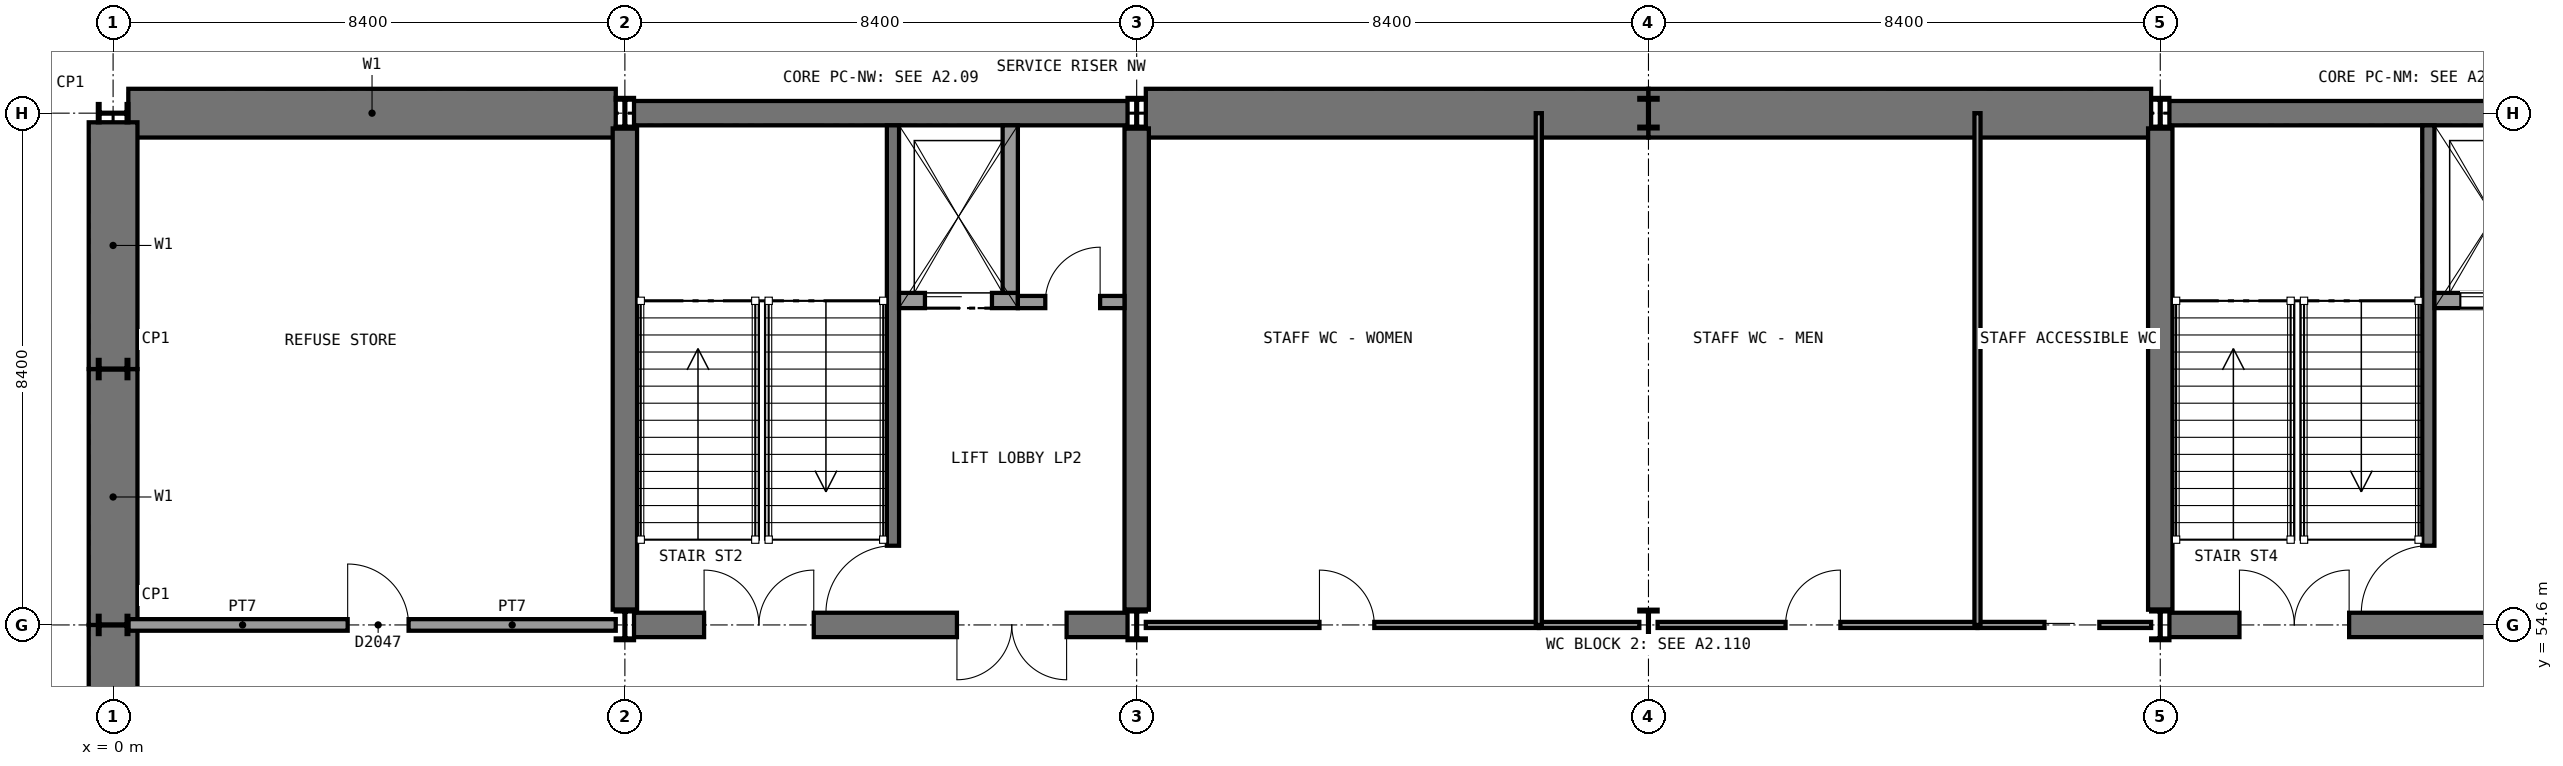
"""IFC4 building model, lengths in metres.
Left out: names, types, materials, properties, quantities, classifications, styles, units other than length and angle.
Written with IfcOpenShell. Run it as: python <this file> out.ifc"""

import sys

from ifc_helpers import new_model, si_unit, direction, frame, frame_2d, origin, origin_2d, place, context, subcontext, project, spatial, rectangle, i_section, extrude, element, fill, save


model = new_model("IFC4")
c1 = context("Model", 3, precision=1e-05, world=origin(), true_north=direction((0.0, 1.0)))
c2 = subcontext(c1, "Body", "Model", "MODEL_VIEW")
j1 = project(units=[si_unit("LENGTHUNIT", "METRE"), si_unit("PLANEANGLEUNIT", "RADIAN")], contexts=[c1])
p1 = place(None, origin())
s1 = spatial("IfcSite", under=j1, at=p1, CompositionType="ELEMENT")
p2 = place(p1, origin())
s2 = spatial("IfcBuilding", under=s1, at=p2, CompositionType="ELEMENT")
p3 = place(p2, frame((0.0, 0.0, -9.9)))
s3 = spatial("IfcBuildingStorey", under=s2, at=p3, CompositionType="ELEMENT", Elevation=-9.9)
p4 = place(p3, frame((0.25, 63.0, 0.0), z_axis=(0.0, 0.0, 1.0), x_axis=(1.0, 0.0, 0.0)))
e1 = element("IfcWall", 1, at=p4, inside=s3, PredefinedType="SOLIDWALL", context=c2, shape_type="SweptSolid", body=[
    extrude(rectangle(XDim=8.0, YDim=0.8, at=frame_2d((4.0, 0.0))), origin(), (0.0, 0.0, 1.0), 4.65),
])
p5 = place(p3, frame((16.95, 63.0, 0.0), z_axis=(0.0, 0.0, 1.0), x_axis=(1.0, 0.0, 0.0)))
e2 = element("IfcWall", 2, at=p5, inside=s3, PredefinedType="SOLIDWALL", context=c2, shape_type="SweptSolid", body=[
    extrude(rectangle(XDim=8.25, YDim=0.8, at=frame_2d((4.125, 0.0))), origin(), (0.0, 0.0, 1.0), 4.65),
])
p6 = place(p3, frame((25.2, 63.0, 0.0), z_axis=(0.0, 0.0, 1.0), x_axis=(1.0, 0.0, 0.0)))
e3 = element("IfcWall", 3, at=p6, inside=s3, PredefinedType="SOLIDWALL", context=c2, shape_type="SweptSolid", body=[
    extrude(rectangle(XDim=8.25, YDim=0.8, at=frame_2d((4.125, 0.0))), origin(), (0.0, 0.0, 1.0), 4.65),
])
p7 = place(p3, frame((0.0, 50.4, 0.0), z_axis=(0.0, 0.0, 1.0), x_axis=(0.0, 1.0, 0.0)))
e4 = element("IfcWall", 4, at=p7, inside=s3, PredefinedType="SOLIDWALL", context=c2, shape_type="SweptSolid", body=[
    extrude(rectangle(XDim=4.2, YDim=0.8, at=frame_2d((2.1, 0.0))), origin(), (0.0, 0.0, 1.0), 4.65),
])
p8 = place(p3, frame((0.0, 54.6, 0.0), z_axis=(0.0, 0.0, 1.0), x_axis=(0.0, 1.0, 0.0)))
e5 = element("IfcWall", 5, at=p8, inside=s3, PredefinedType="SOLIDWALL", context=c2, shape_type="SweptSolid", body=[
    extrude(rectangle(XDim=4.2, YDim=0.8, at=frame_2d((2.1, 0.0))), origin(), (0.0, 0.0, 1.0), 4.65),
])
p9 = place(p3, frame((0.0, 58.8, 0.0), z_axis=(0.0, 0.0, 1.0), x_axis=(0.0, 1.0, 0.0)))
e6 = element("IfcWall", 6, at=p9, inside=s3, PredefinedType="SOLIDWALL", context=c2, shape_type="SweptSolid", body=[
    extrude(rectangle(XDim=4.05, YDim=0.8, at=frame_2d((2.025, 0.0))), origin(), (0.0, 0.0, 1.0), 4.65),
])
p10 = place(p3, frame((8.55, 63.0, 0.0), z_axis=(0.0, 0.0, 1.0), x_axis=(1.0, 0.0, 0.0)))
e7 = element("IfcWall", 7, at=p10, inside=s3, PredefinedType="SHEAR", context=c2, shape_type="SweptSolid", body=[
    extrude(rectangle(XDim=8.1, YDim=0.4, at=frame_2d((4.05, 0.0))), origin(), (0.0, 0.0, 1.0), 4.65),
])
p11 = place(p3, frame((8.55, 54.6, 0.0), z_axis=(0.0, 0.0, 1.0), x_axis=(1.0, 0.0, 0.0)))
e8 = element("IfcWall", 8, at=p11, inside=s3, PredefinedType="SHEAR", context=c2, shape_type="SweptSolid", body=[
    extrude(rectangle(XDim=8.1, YDim=0.4, at=frame_2d((4.05, 0.0))), origin(), (0.0, 0.0, 1.0), 4.65),
])
p12 = place(p11, frame((1.15, 0.0, 0.0)))
e9 = element("IfcOpeningElement", 9, at=p12, cuts=e8, PredefinedType="OPENING", context=c2, shape_type="SweptSolid", body=[
    extrude(rectangle(XDim=1.8, YDim=2.1, at=frame_2d((0.9, 1.05))), frame((0.0, 0.21, 0.0), z_axis=(0.0, -1.0, 0.0), x_axis=(1.0, 0.0, 0.0)), (0.0, 0.0, 1.0), 0.42),
])
p13 = place(p11, frame((5.3, 0.0, 0.0)))
e10 = element("IfcOpeningElement", 10, at=p13, cuts=e8, PredefinedType="OPENING", context=c2, shape_type="SweptSolid", body=[
    extrude(rectangle(XDim=1.8, YDim=2.1, at=frame_2d((0.9, 1.05))), frame((0.0, 0.21, 0.0), z_axis=(0.0, -1.0, 0.0), x_axis=(1.0, 0.0, 0.0)), (0.0, 0.0, 1.0), 0.42),
])
for number, where, z_axis, x_axis in (
    (11, (8.4, 54.85, 0.0), (0.0, 0.0, 1.0), (0.0, 1.0, 0.0)),
    (12, (16.8, 54.85, 0.0), (0.0, 0.0, 1.0), (0.0, 1.0, 0.0)),
):
    element("IfcWall", number, at=place(p3, frame(where, z_axis=z_axis, x_axis=x_axis)), inside=s3, PredefinedType="SHEAR", context=c2, shape_type="SweptSolid", body=[
        extrude(rectangle(XDim=7.9, YDim=0.4, at=frame_2d((3.95, 0.0))), origin(), (0.0, 0.0, 1.0), 4.65),
    ])
p14 = place(p3, frame((33.75, 63.0, 0.0), z_axis=(0.0, 0.0, 1.0), x_axis=(1.0, 0.0, 0.0)))
e13 = element("IfcWall", 13, at=p14, inside=s3, PredefinedType="SHEAR", context=c2, shape_type="SweptSolid", body=[
    extrude(rectangle(XDim=8.1, YDim=0.4, at=frame_2d((4.05, 0.0))), origin(), (0.0, 0.0, 1.0), 4.65),
])
p15 = place(p3, frame((33.75, 54.6, 0.0), z_axis=(0.0, 0.0, 1.0), x_axis=(1.0, 0.0, 0.0)))
e14 = element("IfcWall", 14, at=p15, inside=s3, PredefinedType="SHEAR", context=c2, shape_type="SweptSolid", body=[
    extrude(rectangle(XDim=8.1, YDim=0.4, at=frame_2d((4.05, 0.0))), origin(), (0.0, 0.0, 1.0), 4.65),
])
p16 = place(p15, frame((1.15, 0.0, 0.0)))
e15 = element("IfcOpeningElement", 15, at=p16, cuts=e14, PredefinedType="OPENING", context=c2, shape_type="SweptSolid", body=[
    extrude(rectangle(XDim=1.8, YDim=2.1, at=frame_2d((0.9, 1.05))), frame((0.0, 0.21, 0.0), z_axis=(0.0, -1.0, 0.0), x_axis=(1.0, 0.0, 0.0)), (0.0, 0.0, 1.0), 0.42),
])
p17 = place(p15, frame((5.3, 0.0, 0.0)))
e16 = element("IfcOpeningElement", 16, at=p17, cuts=e14, PredefinedType="OPENING", context=c2, shape_type="SweptSolid", body=[
    extrude(rectangle(XDim=1.8, YDim=2.1, at=frame_2d((0.9, 1.05))), frame((0.0, 0.21, 0.0), z_axis=(0.0, -1.0, 0.0), x_axis=(1.0, 0.0, 0.0)), (0.0, 0.0, 1.0), 0.42),
])
p18 = place(p3, frame((33.6, 54.85, 0.0), z_axis=(0.0, 0.0, 1.0), x_axis=(0.0, 1.0, 0.0)))
e17 = element("IfcWall", 17, at=p18, inside=s3, PredefinedType="SHEAR", context=c2, shape_type="SweptSolid", body=[
    extrude(rectangle(XDim=7.9, YDim=0.4, at=frame_2d((3.95, 0.0))), origin(), (0.0, 0.0, 1.0), 4.65),
])
for number, where, z_axis, x_axis in (
    (18, (0.0, 54.6, 0.0), (0.0, 0.0, 1.0), (0.0, 1.0, 0.0)),
    (19, (0.0, 58.8, 0.0), (0.0, 0.0, 1.0), (0.0, 1.0, 0.0)),
    (20, (0.0, 63.0, 0.0), (0.0, 0.0, 1.0), (0.0, 1.0, 0.0)),
    (21, (8.4, 54.6, 0.0), (0.0, 0.0, 1.0), (1.0, 0.0, 0.0)),
    (22, (8.4, 63.0, 0.0), (0.0, 0.0, 1.0), (1.0, 0.0, 0.0)),
    (23, (16.8, 54.6, 0.0), (0.0, 0.0, 1.0), (1.0, 0.0, 0.0)),
    (24, (16.8, 63.0, 0.0), (0.0, 0.0, 1.0), (1.0, 0.0, 0.0)),
    (25, (25.2, 54.6, 0.0), (0.0, 0.0, 1.0), (1.0, 0.0, 0.0)),
    (26, (25.2, 63.0, 0.0), (0.0, 0.0, 1.0), (1.0, 0.0, 0.0)),
    (27, (33.6, 54.6, 0.0), (0.0, 0.0, 1.0), (1.0, 0.0, 0.0)),
    (28, (33.6, 63.0, 0.0), (0.0, 0.0, 1.0), (1.0, 0.0, 0.0)),
):
    element("IfcColumn", number, at=place(p3, frame(where, z_axis=z_axis, x_axis=x_axis)), inside=s3, PredefinedType="COLUMN", context=c2, shape_type="SweptSolid", body=[
        extrude(i_section(OverallWidth=0.3, OverallDepth=0.5, WebThickness=0.014, FlangeThickness=0.028, FilletRadius=0.027, at=origin_2d()), origin(), (0.0, 0.0, 1.0), 5.0),
    ])
p19 = place(p3, frame((0.25, 54.6, 0.0), z_axis=(0.0, 0.0, 1.0), x_axis=(1.0, 0.0, 0.0)))
e29 = element("IfcWall", 29, at=p19, inside=s3, PredefinedType="SOLIDWALL", context=c2, shape_type="SweptSolid", body=[
    extrude(rectangle(XDim=8.0, YDim=0.19, at=frame_2d((4.0, 0.0))), origin(), (0.0, 0.0, 1.0), 4.65),
])
p20 = place(p19, frame((3.6, 0.0, 0.0)))
e30 = element("IfcOpeningElement", 30, at=p20, cuts=e29, PredefinedType="OPENING", context=c2, shape_type="SweptSolid", body=[
    extrude(rectangle(XDim=1.0, YDim=2.1, at=frame_2d((0.5, 1.05))), frame((0.0, 0.105, 0.0), z_axis=(0.0, -1.0, 0.0), x_axis=(1.0, 0.0, 0.0)), (0.0, 0.0, 1.0), 0.21),
])
p21 = place(p3, frame((16.95, 54.6, 0.0), z_axis=(0.0, 0.0, 1.0), x_axis=(1.0, 0.0, 0.0)))
e31 = element("IfcWall", 31, at=p21, inside=s3, PredefinedType="PARTITIONING", context=c2, shape_type="SweptSolid", body=[
    extrude(rectangle(XDim=6.45, YDim=0.1, at=frame_2d((3.225, 0.0))), origin(), (0.0, 0.0, 1.0), 4.65),
])
p22 = place(p21, frame((2.85, 0.0, 0.0)))
e32 = element("IfcOpeningElement", 32, at=p22, cuts=e31, PredefinedType="OPENING", context=c2, shape_type="SweptSolid", body=[
    extrude(rectangle(XDim=0.9, YDim=2.1, at=frame_2d((0.45, 1.05))), frame((0.0, 0.06, 0.0), z_axis=(0.0, -1.0, 0.0), x_axis=(1.0, 0.0, 0.0)), (0.0, 0.0, 1.0), 0.12),
])
p23 = place(p3, frame((23.4, 54.6, 0.0), z_axis=(0.0, 0.0, 1.0), x_axis=(1.0, 0.0, 0.0)))
e33 = element("IfcWall", 33, at=p23, inside=s3, PredefinedType="PARTITIONING", context=c2, shape_type="SweptSolid", body=[
    extrude(rectangle(XDim=1.65, YDim=0.1, at=frame_2d((0.825, 0.0))), origin(), (0.0, 0.0, 1.0), 4.65),
])
p24 = place(p3, frame((25.35, 54.6, 0.0), z_axis=(0.0, 0.0, 1.0), x_axis=(1.0, 0.0, 0.0)))
e34 = element("IfcWall", 34, at=p24, inside=s3, PredefinedType="PARTITIONING", context=c2, shape_type="SweptSolid", body=[
    extrude(rectangle(XDim=5.25, YDim=0.1, at=frame_2d((2.625, 0.0))), origin(), (0.0, 0.0, 1.0), 4.65),
])
p25 = place(p24, frame((2.1, 0.0, 0.0)))
e35 = element("IfcOpeningElement", 35, at=p25, cuts=e34, PredefinedType="OPENING", context=c2, shape_type="SweptSolid", body=[
    extrude(rectangle(XDim=0.9, YDim=2.1, at=frame_2d((0.45, 1.05))), frame((0.0, 0.06, 0.0), z_axis=(0.0, -1.0, 0.0), x_axis=(1.0, 0.0, 0.0)), (0.0, 0.0, 1.0), 0.12),
])
p26 = place(p3, frame((30.6, 54.6, 0.0), z_axis=(0.0, 0.0, 1.0), x_axis=(1.0, 0.0, 0.0)))
e36 = element("IfcWall", 36, at=p26, inside=s3, PredefinedType="PARTITIONING", context=c2, shape_type="SweptSolid", body=[
    extrude(rectangle(XDim=2.85, YDim=0.1, at=frame_2d((1.425, 0.0))), origin(), (0.0, 0.0, 1.0), 4.65),
])
p27 = place(p26, frame((1.1, 0.0, 0.0)))
e37 = element("IfcOpeningElement", 37, at=p27, cuts=e36, PredefinedType="OPENING", context=c2, shape_type="SweptSolid", body=[
    extrude(rectangle(XDim=0.9, YDim=2.1, at=frame_2d((0.45, 1.05))), frame((0.0, 0.06, 0.0), z_axis=(0.0, -1.0, 0.0), x_axis=(1.0, 0.0, 0.0)), (0.0, 0.0, 1.0), 0.12),
])
for number, where, z_axis, x_axis in (
    (38, (23.4, 54.6, 0.0), (0.0, 0.0, 1.0), (0.0, 1.0, 0.0)),
    (39, (30.6, 54.6, 0.0), (0.0, 0.0, 1.0), (0.0, 1.0, 0.0)),
):
    element("IfcWall", number, at=place(p3, frame(where, z_axis=z_axis, x_axis=x_axis)), inside=s3, PredefinedType="PARTITIONING", context=c2, shape_type="SweptSolid", body=[
        extrude(rectangle(XDim=8.4, YDim=0.1, at=frame_2d((4.2, 0.0))), origin(), (0.0, 0.0, 1.0), 4.65),
    ])
p28 = place(p3, frame((12.8, 62.8, 0.0), z_axis=(0.0, 0.0, 1.0), x_axis=(0.0, -1.0, 0.0)))
e40 = element("IfcWall", 40, at=p28, inside=s3, PredefinedType="SHEAR", context=c2, shape_type="SweptSolid", body=[
    extrude(rectangle(XDim=8.0, YDim=0.2, at=frame_2d((4.0, 0.0))), origin(), (0.0, 0.0, 1.0), 4.65),
])
p29 = place(p28, frame((6.9, 0.0, 0.0)))
e41 = element("IfcOpeningElement", 41, at=p29, cuts=e40, PredefinedType="OPENING", context=c2, shape_type="SweptSolid", body=[
    extrude(rectangle(XDim=1.11, YDim=2.1, at=frame_2d((0.555, 1.05))), frame((0.0, 0.11, 0.0), z_axis=(0.0, -1.0, 0.0), x_axis=(1.0, 0.0, 0.0)), (0.0, 0.0, 1.0), 0.22),
])
p30 = place(p3, frame((12.9, 59.925, -1.4), z_axis=(0.0, 0.0, 1.0), x_axis=(1.0, 0.0, 0.0)))
e42 = element("IfcWall", 42, at=p30, inside=s3, PredefinedType="SOLIDWALL", context=c2, shape_type="SweptSolid", body=[
    extrude(rectangle(XDim=1.95, YDim=0.25, at=frame_2d((0.975, 0.0))), origin(), (0.0, 0.0, 1.0), 6.4),
])
p31 = place(p30, frame((0.425, 0.0, 1.4)))
e43 = element("IfcOpeningElement", 43, at=p31, cuts=e42, PredefinedType="OPENING", context=c2, shape_type="SweptSolid", body=[
    extrude(rectangle(XDim=1.1, YDim=2.1, at=frame_2d((0.55, 1.05))), frame((0.0, 0.135, 0.0), z_axis=(0.0, -1.0, 0.0), x_axis=(1.0, 0.0, 0.0)), (0.0, 0.0, 1.0), 0.27),
])
p32 = place(p3, frame((14.725, 62.8, -1.4), z_axis=(0.0, 0.0, 1.0), x_axis=(0.0, -1.0, 0.0)))
e44 = element("IfcWall", 44, at=p32, inside=s3, PredefinedType="SOLIDWALL", context=c2, shape_type="SweptSolid", body=[
    extrude(rectangle(XDim=2.75, YDim=0.25, at=frame_2d((1.375, 0.0))), origin(), (0.0, 0.0, 1.0), 6.4),
])
p33 = place(p3, frame((14.85, 59.9, 0.0), z_axis=(0.0, 0.0, 1.0), x_axis=(1.0, 0.0, 0.0)))
e45 = element("IfcWall", 45, at=p33, inside=s3, PredefinedType="PARTITIONING", context=c2, shape_type="SweptSolid", body=[
    extrude(rectangle(XDim=1.75, YDim=0.2, at=frame_2d((0.875, 0.0))), origin(), (0.0, 0.0, 1.0), 4.65),
])
p34 = place(p33, frame((0.45, 0.0, 0.0)))
e46 = element("IfcOpeningElement", 46, at=p34, cuts=e45, PredefinedType="OPENING", context=c2, shape_type="SweptSolid", body=[
    extrude(rectangle(XDim=0.9, YDim=2.1, at=frame_2d((0.45, 1.05))), frame((0.0, 0.11, 0.0), z_axis=(0.0, -1.0, 0.0), x_axis=(1.0, 0.0, 0.0)), (0.0, 0.0, 1.0), 0.22),
])
p35 = place(p3, frame((38.0, 62.8, 0.0), z_axis=(0.0, 0.0, 1.0), x_axis=(0.0, -1.0, 0.0)))
e47 = element("IfcWall", 47, at=p35, inside=s3, PredefinedType="SHEAR", context=c2, shape_type="SweptSolid", body=[
    extrude(rectangle(XDim=8.0, YDim=0.2, at=frame_2d((4.0, 0.0))), origin(), (0.0, 0.0, 1.0), 4.65),
])
p36 = place(p35, frame((6.9, 0.0, 0.0)))
e48 = element("IfcOpeningElement", 48, at=p36, cuts=e47, PredefinedType="OPENING", context=c2, shape_type="SweptSolid", body=[
    extrude(rectangle(XDim=1.11, YDim=2.1, at=frame_2d((0.555, 1.05))), frame((0.0, 0.11, 0.0), z_axis=(0.0, -1.0, 0.0), x_axis=(1.0, 0.0, 0.0)), (0.0, 0.0, 1.0), 0.22),
])
p37 = place(p3, frame((38.1, 59.925, -1.4), z_axis=(0.0, 0.0, 1.0), x_axis=(1.0, 0.0, 0.0)))
e49 = element("IfcWall", 49, at=p37, inside=s3, PredefinedType="SOLIDWALL", context=c2, shape_type="SweptSolid", body=[
    extrude(rectangle(XDim=1.95, YDim=0.25, at=frame_2d((0.975, 0.0))), origin(), (0.0, 0.0, 1.0), 6.4),
])
p38 = place(p37, frame((0.425, 0.0, 1.4)))
e50 = element("IfcOpeningElement", 50, at=p38, cuts=e49, PredefinedType="OPENING", context=c2, shape_type="SweptSolid", body=[
    extrude(rectangle(XDim=1.1, YDim=2.1, at=frame_2d((0.55, 1.05))), frame((0.0, 0.135, 0.0), z_axis=(0.0, -1.0, 0.0), x_axis=(1.0, 0.0, 0.0)), (0.0, 0.0, 1.0), 0.27),
])
p39 = place(p20, origin())
e51 = element("IfcDoor", 51, at=p39, inside=s3, OperationType="SINGLE_SWING_LEFT", PredefinedType="DOOR", context=c2, shape_type="SweptSolid", body=[
    extrude(rectangle(XDim=1.0, YDim=2.1, at=frame_2d((0.5, 1.05))), frame((0.0, 0.025, 0.0), z_axis=(0.0, -1.0, 0.0), x_axis=(1.0, 0.0, 0.0)), (0.0, 0.0, 1.0), 0.05),
])
fill(e30, e51)
p40 = place(p22, origin())
e52 = element("IfcDoor", 52, at=p40, inside=s3, OperationType="SINGLE_SWING_LEFT", PredefinedType="DOOR", context=c2, shape_type="SweptSolid", body=[
    extrude(rectangle(XDim=0.9, YDim=2.1, at=frame_2d((0.45, 1.05))), frame((0.0, 0.025, 0.0), z_axis=(0.0, -1.0, 0.0), x_axis=(1.0, 0.0, 0.0)), (0.0, 0.0, 1.0), 0.05),
])
fill(e32, e52)
p41 = place(p25, origin())
e53 = element("IfcDoor", 53, at=p41, inside=s3, OperationType="SINGLE_SWING_RIGHT", PredefinedType="DOOR", context=c2, shape_type="SweptSolid", body=[
    extrude(rectangle(XDim=0.9, YDim=2.1, at=frame_2d((0.45, 1.05))), frame((0.0, 0.025, 0.0), z_axis=(0.0, -1.0, 0.0), x_axis=(1.0, 0.0, 0.0)), (0.0, 0.0, 1.0), 0.05),
])
fill(e35, e53)
p42 = place(p27, frame((0.9, 0.0, 0.0), z_axis=(0.0, 0.0, 1.0), x_axis=(-1.0, 0.0, 0.0)))
e54 = element("IfcDoor", 54, at=p42, inside=s3, OperationType="SLIDING_TO_RIGHT", PredefinedType="DOOR", context=c2, shape_type="SweptSolid", body=[
    extrude(rectangle(XDim=0.9, YDim=2.1, at=frame_2d((0.45, 1.05))), frame((0.0, 0.025, 0.0), z_axis=(0.0, -1.0, 0.0), x_axis=(1.0, 0.0, 0.0)), (0.0, 0.0, 1.0), 0.05),
])
fill(e37, e54)
p43 = place(p29, frame((1.1, 0.0, 0.0), z_axis=(0.0, 0.0, 1.0), x_axis=(-1.0, 0.0, 0.0)))
e55 = element("IfcDoor", 55, at=p43, inside=s3, OperationType="SINGLE_SWING_LEFT", PredefinedType="DOOR", context=c2, shape_type="SweptSolid", body=[
    extrude(rectangle(XDim=1.1, YDim=2.1, at=frame_2d((0.55, 1.05))), frame((0.0, 0.025, 0.0), z_axis=(0.0, -1.0, 0.0), x_axis=(1.0, 0.0, 0.0)), (0.0, 0.0, 1.0), 0.05),
])
fill(e41, e55)
p44 = place(p31, frame((1.1, 0.0, 0.0), z_axis=(0.0, 0.0, 1.0), x_axis=(-1.0, 0.0, 0.0)))
e56 = element("IfcDoor", 56, at=p44, inside=s3, OperationType="SLIDING_TO_RIGHT", PredefinedType="DOOR", context=c2, shape_type="SweptSolid", body=[
    extrude(rectangle(XDim=1.1, YDim=2.1, at=frame_2d((0.55, 1.05))), frame((0.0, 0.025, 0.0), z_axis=(0.0, -1.0, 0.0), x_axis=(1.0, 0.0, 0.0)), (0.0, 0.0, 1.0), 0.05),
])
fill(e43, e56)
p45 = place(p34, origin())
e57 = element("IfcDoor", 57, at=p45, inside=s3, OperationType="SINGLE_SWING_RIGHT", PredefinedType="DOOR", context=c2, shape_type="SweptSolid", body=[
    extrude(rectangle(XDim=0.9, YDim=2.1, at=frame_2d((0.45, 1.05))), frame((0.0, 0.025, 0.0), z_axis=(0.0, -1.0, 0.0), x_axis=(1.0, 0.0, 0.0)), (0.0, 0.0, 1.0), 0.05),
])
fill(e46, e57)
p46 = place(p12, origin())
e58 = element("IfcDoor", 58, at=p46, inside=s3, OperationType="DOUBLE_DOOR_SINGLE_SWING", PredefinedType="DOOR", context=c2, shape_type="SweptSolid", body=[
    extrude(rectangle(XDim=1.8, YDim=2.1, at=frame_2d((0.9, 1.05))), frame((0.0, 0.025, 0.0), z_axis=(0.0, -1.0, 0.0), x_axis=(1.0, 0.0, 0.0)), (0.0, 0.0, 1.0), 0.05),
])
fill(e9, e58)
p47 = place(p13, frame((1.8, 0.0, 0.0), z_axis=(0.0, 0.0, 1.0), x_axis=(-1.0, 0.0, 0.0)))
e59 = element("IfcDoor", 59, at=p47, inside=s3, OperationType="DOUBLE_DOOR_SINGLE_SWING", PredefinedType="DOOR", context=c2, shape_type="SweptSolid", body=[
    extrude(rectangle(XDim=1.8, YDim=2.1, at=frame_2d((0.9, 1.05))), frame((0.0, 0.025, 0.0), z_axis=(0.0, -1.0, 0.0), x_axis=(1.0, 0.0, 0.0)), (0.0, 0.0, 1.0), 0.05),
])
fill(e10, e59)
p48 = place(p36, frame((1.1, 0.0, 0.0), z_axis=(0.0, 0.0, 1.0), x_axis=(-1.0, 0.0, 0.0)))
e60 = element("IfcDoor", 60, at=p48, inside=s3, OperationType="SINGLE_SWING_LEFT", PredefinedType="DOOR", context=c2, shape_type="SweptSolid", body=[
    extrude(rectangle(XDim=1.1, YDim=2.1, at=frame_2d((0.55, 1.05))), frame((0.0, 0.025, 0.0), z_axis=(0.0, -1.0, 0.0), x_axis=(1.0, 0.0, 0.0)), (0.0, 0.0, 1.0), 0.05),
])
fill(e48, e60)
p49 = place(p38, frame((1.1, 0.0, 0.0), z_axis=(0.0, 0.0, 1.0), x_axis=(-1.0, 0.0, 0.0)))
e61 = element("IfcDoor", 61, at=p49, inside=s3, OperationType="SLIDING_TO_RIGHT", PredefinedType="DOOR", context=c2, shape_type="SweptSolid", body=[
    extrude(rectangle(XDim=1.1, YDim=2.1, at=frame_2d((0.55, 1.05))), frame((0.0, 0.025, 0.0), z_axis=(0.0, -1.0, 0.0), x_axis=(1.0, 0.0, 0.0)), (0.0, 0.0, 1.0), 0.05),
])
fill(e50, e61)
p50 = place(p16, origin())
e62 = element("IfcDoor", 62, at=p50, inside=s3, OperationType="DOUBLE_DOOR_SINGLE_SWING", PredefinedType="DOOR", context=c2, shape_type="SweptSolid", body=[
    extrude(rectangle(XDim=1.8, YDim=2.1, at=frame_2d((0.9, 1.05))), frame((0.0, 0.025, 0.0), z_axis=(0.0, -1.0, 0.0), x_axis=(1.0, 0.0, 0.0)), (0.0, 0.0, 1.0), 0.05),
])
fill(e15, e62)
save(model, sys.argv[1])
